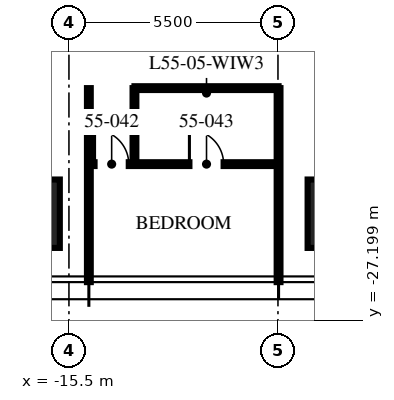
"""IFC4 building model, lengths in metres.
Left out: names, types, materials, properties, quantities, classifications, styles, units other than length and angle.
Written with IfcOpenShell. Run it as: python <this file> out.ifc"""

import sys

from ifc_helpers import new_model, si_unit, direction, frame, frame_2d, origin, origin_2d, place, context, subcontext, project, spatial, rectangle, extrude, element, fill, save


model = new_model("IFC4")
c1 = context("Model", 3, precision=1e-05, world=origin(), true_north=direction((0.0, 1.0)))
c2 = subcontext(c1, "Body", "Model", "MODEL_VIEW")
j1 = project(units=[si_unit("LENGTHUNIT", "METRE"), si_unit("PLANEANGLEUNIT", "RADIAN")], contexts=[c1])
p1 = place(None, origin())
s1 = spatial("IfcSite", under=j1, at=p1, CompositionType="ELEMENT")
p2 = place(p1, origin())
s2 = spatial("IfcBuilding", under=s1, at=p2, CompositionType="ELEMENT")
p3 = place(p2, frame((0.0, 0.0, 222.0)))
s3 = spatial("IfcBuildingStorey", under=s2, at=p3, CompositionType="ELEMENT", Elevation=222.0)
for number, where, z_axis, x_axis in (
    (1, (-8.32, -24.4, 0.0), (0.0, 0.0, 1.0), (1.0, 0.0, 0.0)),
    (2, (-16.64, -24.4, 0.0), (0.0, 0.0, 1.0), (1.0, 0.0, 0.0)),
):
    element("IfcColumn", number, at=place(p3, frame(where, z_axis=z_axis, x_axis=x_axis)), inside=s3, PredefinedType="COLUMN", context=c2, shape_type="SweptSolid", body=[
        extrude(rectangle(XDim=1.8, YDim=1.8, at=origin_2d()), origin(), (0.0, 0.0, 1.0), 3.75),
    ])
for number, where, z_axis, x_axis in (
    (3, (-14.976, -21.095, 0.0), (0.0, 0.0, 1.0), (0.0, -1.0, 0.0)),
    (4, (-9.984, -21.095, 0.0), (0.0, 0.0, 1.0), (0.0, -1.0, 0.0)),
):
    element("IfcWall", number, at=place(p3, frame(where, z_axis=z_axis, x_axis=x_axis)), inside=s3, PredefinedType="PARTITIONING", context=c2, shape_type="SweptSolid", body=[
        extrude(rectangle(XDim=5.105, YDim=0.1, at=frame_2d((2.552, 0.0))), origin(), (0.0, 0.0, 1.0), 2.91),
    ])
p4 = place(p3, frame((-14.976, -23.095, 0.0), z_axis=(0.0, 0.0, 1.0), x_axis=(1.0, 0.0, 0.0)))
e5 = element("IfcWall", 5, at=p4, inside=s3, PredefinedType="PARTITIONING", context=c2, shape_type="SweptSolid", body=[
    extrude(rectangle(XDim=4.992, YDim=0.1, at=frame_2d((2.496, 0.0))), origin(), (0.0, 0.0, 1.0), 2.81),
])
p5 = place(p4, frame((0.15, 0.0, 0.0)))
e6 = element("IfcOpeningElement", 6, at=p5, cuts=e5, PredefinedType="OPENING", context=c2, shape_type="SweptSolid", body=[
    extrude(rectangle(XDim=0.9, YDim=2.1, at=frame_2d((0.45, 1.05))), frame((0.0, 0.06, 0.0), z_axis=(0.0, -1.0, 0.0), x_axis=(1.0, 0.0, 0.0)), (0.0, 0.0, 1.0), 0.12),
])
p6 = place(p4, frame((2.646, 0.0, 0.0)))
e7 = element("IfcOpeningElement", 7, at=p6, cuts=e5, PredefinedType="OPENING", context=c2, shape_type="SweptSolid", body=[
    extrude(rectangle(XDim=0.9, YDim=2.1, at=frame_2d((0.45, 1.05))), frame((0.0, 0.06, 0.0), z_axis=(0.0, -1.0, 0.0), x_axis=(1.0, 0.0, 0.0)), (0.0, 0.0, 1.0), 0.12),
])
p7 = place(p3, frame((-13.776, -21.095, 0.0), z_axis=(0.0, 0.0, 1.0), x_axis=(0.0, -1.0, 0.0)))
e8 = element("IfcWall", 8, at=p7, inside=s3, PredefinedType="PARTITIONING", context=c2, shape_type="SweptSolid", body=[
    extrude(rectangle(XDim=2.0, YDim=0.1, at=frame_2d((1.0, 0.0))), origin(), (0.0, 0.0, 1.0), 3.5),
])
p8 = place(p3, frame((-13.776, -21.095, 0.0), z_axis=(0.0, 0.0, 1.0), x_axis=(1.0, 0.0, 0.0)))
e9 = element("IfcWall", 9, at=p8, inside=s3, PredefinedType="PARTITIONING", context=c2, shape_type="SweptSolid", body=[
    extrude(rectangle(XDim=3.792, YDim=0.1, at=frame_2d((1.896, 0.0))), origin(), (0.0, 0.0, 1.0), 2.81),
])
p9 = place(p5, origin())
e10 = element("IfcDoor", 10, at=p9, inside=s3, OperationType="SINGLE_SWING_LEFT", PredefinedType="DOOR", context=c2, shape_type="SweptSolid", body=[
    extrude(rectangle(XDim=0.9, YDim=2.1, at=frame_2d((0.45, 1.05))), frame((0.0, 0.025, 0.0), z_axis=(0.0, -1.0, 0.0), x_axis=(1.0, 0.0, 0.0)), (0.0, 0.0, 1.0), 0.05),
])
fill(e6, e10)
p10 = place(p6, origin())
e11 = element("IfcDoor", 11, at=p10, inside=s3, OperationType="SINGLE_SWING_LEFT", PredefinedType="DOOR", context=c2, shape_type="SweptSolid", body=[
    extrude(rectangle(XDim=0.9, YDim=2.1, at=frame_2d((0.45, 1.05))), frame((0.0, 0.025, 0.0), z_axis=(0.0, -1.0, 0.0), x_axis=(1.0, 0.0, 0.0)), (0.0, 0.0, 1.0), 0.05),
])
fill(e7, e11)
save(model, sys.argv[1])
